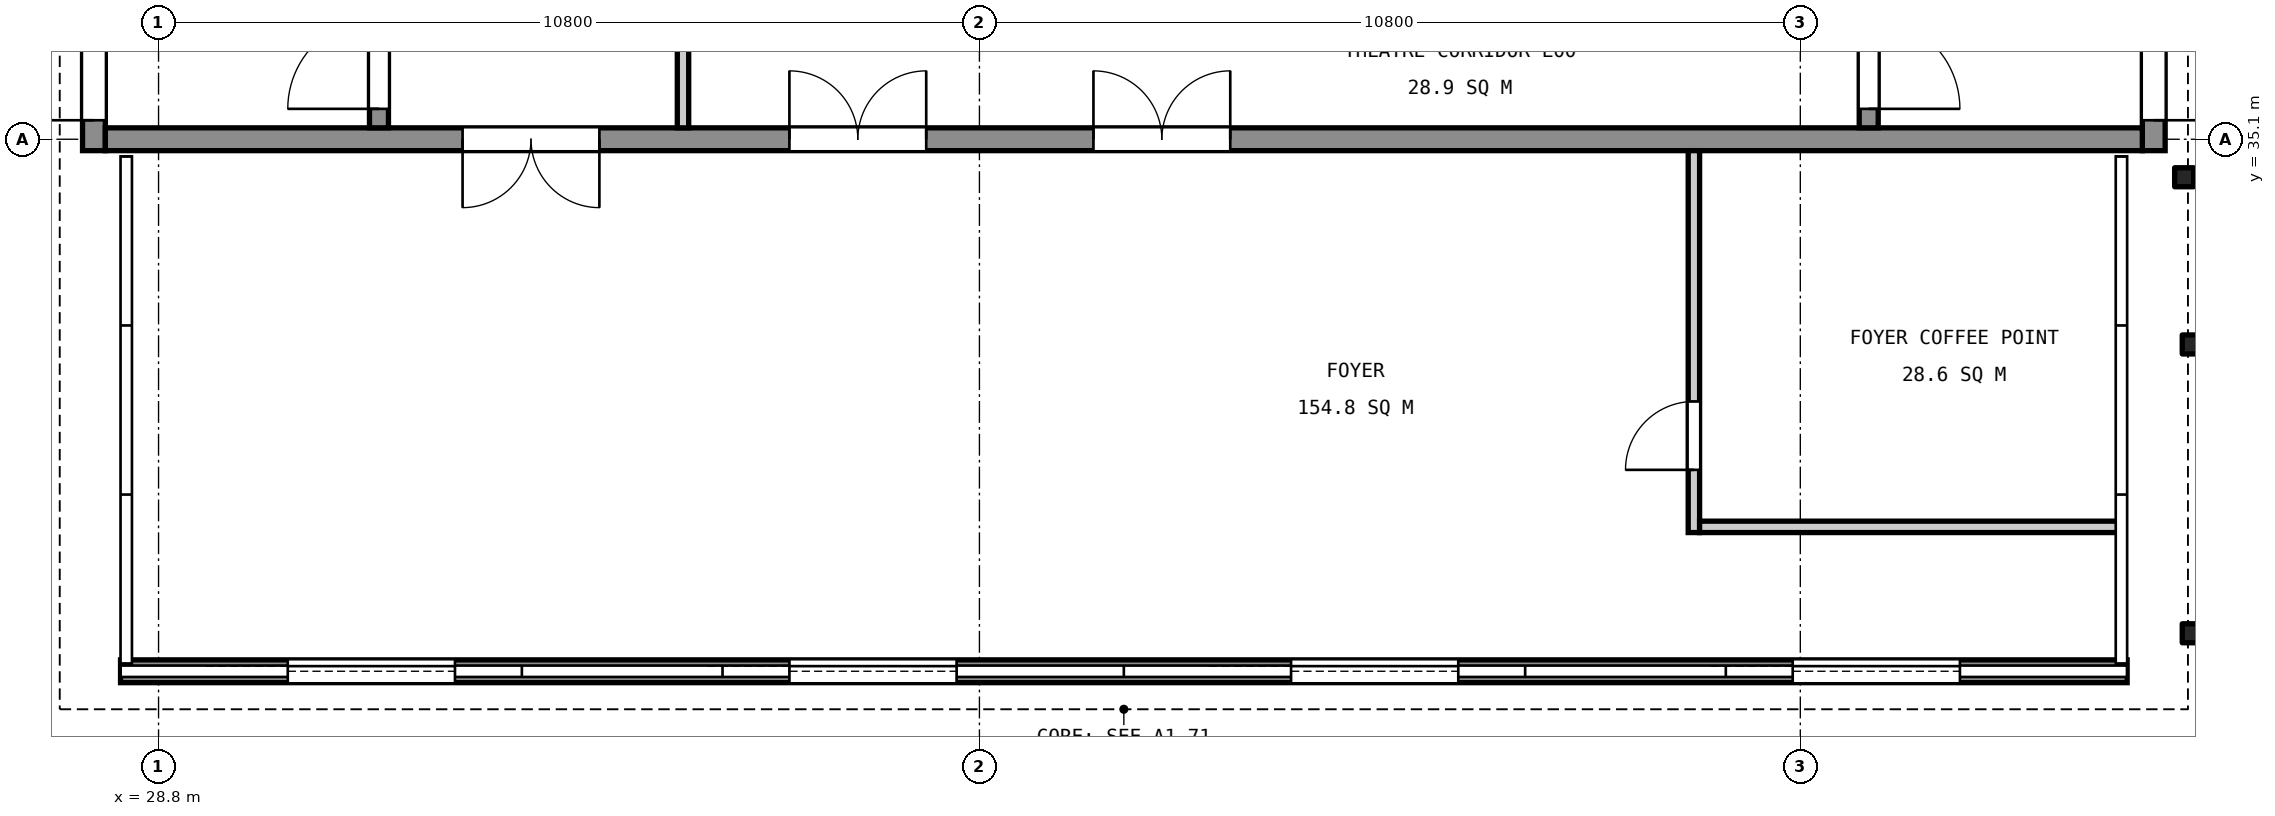
"""IFC4 building model, lengths in metres.
Left out: names, types, materials, properties, quantities, classifications, styles, units other than length and angle.
Written with IfcOpenShell. Run it as: python <this file> out.ifc"""

import sys

from ifc_helpers import new_model, si_unit, direction, frame, frame_2d, origin, origin_2d, place, context, subcontext, project, spatial, rectangle, i_section, extrude, element, fill, save


model = new_model("IFC4")
c1 = context("Model", 3, precision=1e-05, world=origin(), true_north=direction((0.0, 1.0)))
c2 = subcontext(c1, "Body", "Model", "MODEL_VIEW")
j1 = project(units=[si_unit("LENGTHUNIT", "METRE"), si_unit("PLANEANGLEUNIT", "RADIAN")], contexts=[c1])
p1 = place(None, origin())
s1 = spatial("IfcSite", under=j1, at=p1, CompositionType="ELEMENT")
p2 = place(p1, origin())
s2 = spatial("IfcBuilding", under=s1, at=p2, CompositionType="ELEMENT")
p3 = place(p2, origin())
s3 = spatial("IfcBuildingStorey", under=s2, at=p3, CompositionType="ELEMENT", Elevation=0.0)
p4 = place(p3, frame((27.95, 34.95, 0.0), z_axis=(0.0, 0.0, 1.0), x_axis=(0.0, 1.0, 0.0)))
e1 = element("IfcWall", 1, at=p4, inside=s3, PredefinedType="SOLIDWALL", context=c2, shape_type="SweptSolid", body=[
    extrude(rectangle(XDim=8.05, YDim=0.3, at=frame_2d((4.025, 0.0))), origin(), (0.0, 0.0, 1.0), 5.7),
])
p5 = place(p4, frame((0.4, 0.0, 0.0)))
e2 = element("IfcOpeningElement", 2, at=p5, cuts=e1, PredefinedType="OPENING", context=c2, shape_type="SweptSolid", body=[
    extrude(rectangle(XDim=1.5, YDim=2.4, at=frame_2d((0.75, 1.2))), frame((0.0, 0.16, 0.0), z_axis=(0.0, -1.0, 0.0), x_axis=(1.0, 0.0, 0.0)), (0.0, 0.0, 1.0), 0.32),
])
p6 = place(p4, frame((3.25, 0.0, 0.9)))
e3 = element("IfcOpeningElement", 3, at=p6, cuts=e1, PredefinedType="OPENING", context=c2, shape_type="SweptSolid", body=[
    extrude(rectangle(XDim=2.4, YDim=1.8, at=frame_2d((1.2, 0.9))), frame((0.0, 0.16, 0.0), z_axis=(0.0, -1.0, 0.0), x_axis=(1.0, 0.0, 0.0)), (0.0, 0.0, 1.0), 0.32),
])
p7 = place(p4, frame((5.95, 0.0, 0.8)))
e4 = element("IfcOpeningElement", 4, at=p7, cuts=e1, PredefinedType="OPENING", context=c2, shape_type="SweptSolid", body=[
    extrude(rectangle(XDim=0.75, YDim=1.2, at=frame_2d((0.375, 0.6))), frame((0.0, 0.16, 0.0), z_axis=(0.0, -1.0, 0.0), x_axis=(1.0, 0.0, 0.0)), (0.0, 0.0, 1.0), 0.32),
])
p8 = place(p3, frame((55.05, 34.95, 0.0), z_axis=(0.0, 0.0, 1.0), x_axis=(0.0, 1.0, 0.0)))
e5 = element("IfcWall", 5, at=p8, inside=s3, PredefinedType="SOLIDWALL", context=c2, shape_type="SweptSolid", body=[
    extrude(rectangle(XDim=8.05, YDim=0.3, at=frame_2d((4.025, 0.0))), origin(), (0.0, 0.0, 1.0), 5.7),
])
p9 = place(p8, frame((0.4, 0.0, 0.0)))
e6 = element("IfcOpeningElement", 6, at=p9, cuts=e5, PredefinedType="OPENING", context=c2, shape_type="SweptSolid", body=[
    extrude(rectangle(XDim=1.5, YDim=2.4, at=frame_2d((0.75, 1.2))), frame((0.0, 0.16, 0.0), z_axis=(0.0, -1.0, 0.0), x_axis=(1.0, 0.0, 0.0)), (0.0, 0.0, 1.0), 0.32),
])
p10 = place(p8, frame((3.25, 0.0, 0.9)))
e7 = element("IfcOpeningElement", 7, at=p10, cuts=e5, PredefinedType="OPENING", context=c2, shape_type="SweptSolid", body=[
    extrude(rectangle(XDim=2.4, YDim=1.8, at=frame_2d((1.2, 0.9))), frame((0.0, 0.16, 0.0), z_axis=(0.0, -1.0, 0.0), x_axis=(1.0, 0.0, 0.0)), (0.0, 0.0, 1.0), 0.32),
])
p11 = place(p8, frame((5.95, 0.0, 0.8)))
e8 = element("IfcOpeningElement", 8, at=p11, cuts=e5, PredefinedType="OPENING", context=c2, shape_type="SweptSolid", body=[
    extrude(rectangle(XDim=0.75, YDim=1.2, at=frame_2d((0.375, 0.6))), frame((0.0, 0.16, 0.0), z_axis=(0.0, -1.0, 0.0), x_axis=(1.0, 0.0, 0.0)), (0.0, 0.0, 1.0), 0.32),
])
p12 = place(p3, frame((28.1, 35.1, 0.0), z_axis=(0.0, 0.0, 1.0), x_axis=(1.0, 0.0, 0.0)))
e9 = element("IfcWall", 9, at=p12, inside=s3, PredefinedType="SOLIDWALL", context=c2, shape_type="SweptSolid", body=[
    extrude(rectangle(XDim=26.8, YDim=0.3, at=frame_2d((13.4, 0.0))), origin(), (0.0, 0.0, 1.0), 5.7),
])
p13 = place(p12, frame((4.7, 0.0, 0.0)))
e10 = element("IfcOpeningElement", 10, at=p13, cuts=e9, PredefinedType="OPENING", context=c2, shape_type="SweptSolid", body=[
    extrude(rectangle(XDim=1.8, YDim=2.4, at=frame_2d((0.9, 1.2))), frame((0.0, 0.16, 0.0), z_axis=(0.0, -1.0, 0.0), x_axis=(1.0, 0.0, 0.0)), (0.0, 0.0, 1.0), 0.32),
])
p14 = place(p12, frame((9.0, 0.0, 0.0)))
e11 = element("IfcOpeningElement", 11, at=p14, cuts=e9, PredefinedType="OPENING", context=c2, shape_type="SweptSolid", body=[
    extrude(rectangle(XDim=1.8, YDim=2.4, at=frame_2d((0.9, 1.2))), frame((0.0, 0.16, 0.0), z_axis=(0.0, -1.0, 0.0), x_axis=(1.0, 0.0, 0.0)), (0.0, 0.0, 1.0), 0.32),
])
p15 = place(p12, frame((13.0, 0.0, 0.0)))
e12 = element("IfcOpeningElement", 12, at=p15, cuts=e9, PredefinedType="OPENING", context=c2, shape_type="SweptSolid", body=[
    extrude(rectangle(XDim=1.8, YDim=2.4, at=frame_2d((0.9, 1.2))), frame((0.0, 0.16, 0.0), z_axis=(0.0, -1.0, 0.0), x_axis=(1.0, 0.0, 0.0)), (0.0, 0.0, 1.0), 0.32),
])
p16 = place(p3, frame((31.7, 35.25, 0.0), z_axis=(0.0, 0.0, 1.0), x_axis=(0.0, 1.0, 0.0)))
e13 = element("IfcWall", 13, at=p16, inside=s3, PredefinedType="SOLIDWALL", context=c2, shape_type="SweptSolid", body=[
    extrude(rectangle(XDim=7.75, YDim=0.25, at=frame_2d((3.875, 0.0))), origin(), (0.0, 0.0, 1.0), 5.7),
])
p17 = place(p16, frame((0.25, 0.0, 0.0)))
e14 = element("IfcOpeningElement", 14, at=p17, cuts=e13, PredefinedType="OPENING", context=c2, shape_type="SweptSolid", body=[
    extrude(rectangle(XDim=1.2, YDim=2.1, at=frame_2d((0.6, 1.05))), frame((0.0, 0.135, 0.0), z_axis=(0.0, -1.0, 0.0), x_axis=(1.0, 0.0, 0.0)), (0.0, 0.0, 1.0), 0.27),
])
p18 = place(p3, frame((51.3, 35.25, 0.0), z_axis=(0.0, 0.0, 1.0), x_axis=(0.0, 1.0, 0.0)))
e15 = element("IfcWall", 15, at=p18, inside=s3, PredefinedType="SOLIDWALL", context=c2, shape_type="SweptSolid", body=[
    extrude(rectangle(XDim=7.75, YDim=0.25, at=frame_2d((3.875, 0.0))), origin(), (0.0, 0.0, 1.0), 5.7),
])
p19 = place(p18, frame((0.25, 0.0, 0.0)))
e16 = element("IfcOpeningElement", 16, at=p19, cuts=e15, PredefinedType="OPENING", context=c2, shape_type="SweptSolid", body=[
    extrude(rectangle(XDim=1.2, YDim=2.1, at=frame_2d((0.6, 1.05))), frame((0.0, 0.135, 0.0), z_axis=(0.0, -1.0, 0.0), x_axis=(1.0, 0.0, 0.0)), (0.0, 0.0, 1.0), 0.27),
])
p20 = place(p3, frame((35.7, 35.25, 0.0), z_axis=(0.0, 0.0, 1.0), x_axis=(0.0, 1.0, 0.0)))
e17 = element("IfcWall", 17, at=p20, inside=s3, PredefinedType="SOLIDWALL", context=c2, shape_type="SweptSolid", body=[
    extrude(rectangle(XDim=7.75, YDim=0.15, at=frame_2d((3.875, 0.0))), origin(), (0.0, 0.0, 1.0), 5.7),
])
p21 = place(p3, frame((28.3, 28.1, 0.0), z_axis=(0.0, 0.0, 1.0), x_axis=(1.0, 0.0, 0.0)))
e18 = element("IfcWall", 18, at=p21, inside=s3, PredefinedType="SOLIDWALL", context=c2, shape_type="SweptSolid", body=[
    extrude(rectangle(XDim=26.4, YDim=0.3, at=frame_2d((13.2, 0.0))), origin(), (0.0, 0.0, 1.0), 2.6),
])
p22 = place(p21, frame((2.2, 0.0, 0.0)))
e19 = element("IfcOpeningElement", 19, at=p22, cuts=e18, PredefinedType="OPENING", context=c2, shape_type="SweptSolid", body=[
    extrude(rectangle(XDim=2.2, YDim=2.4, at=frame_2d((1.1, 1.2))), frame((0.0, 0.16, 0.0), z_axis=(0.0, -1.0, 0.0), x_axis=(1.0, 0.0, 0.0)), (0.0, 0.0, 1.0), 0.32),
])
p23 = place(p21, frame((8.8, 0.0, 0.0)))
e20 = element("IfcOpeningElement", 20, at=p23, cuts=e18, PredefinedType="OPENING", context=c2, shape_type="SweptSolid", body=[
    extrude(rectangle(XDim=2.2, YDim=2.4, at=frame_2d((1.1, 1.2))), frame((0.0, 0.16, 0.0), z_axis=(0.0, -1.0, 0.0), x_axis=(1.0, 0.0, 0.0)), (0.0, 0.0, 1.0), 0.32),
])
p24 = place(p21, frame((15.4, 0.0, 0.0)))
e21 = element("IfcOpeningElement", 21, at=p24, cuts=e18, PredefinedType="OPENING", context=c2, shape_type="SweptSolid", body=[
    extrude(rectangle(XDim=2.2, YDim=2.4, at=frame_2d((1.1, 1.2))), frame((0.0, 0.16, 0.0), z_axis=(0.0, -1.0, 0.0), x_axis=(1.0, 0.0, 0.0)), (0.0, 0.0, 1.0), 0.32),
])
p25 = place(p21, frame((22.0, 0.0, 0.0)))
e22 = element("IfcOpeningElement", 22, at=p25, cuts=e18, PredefinedType="OPENING", context=c2, shape_type="SweptSolid", body=[
    extrude(rectangle(XDim=2.2, YDim=2.4, at=frame_2d((1.1, 1.2))), frame((0.0, 0.16, 0.0), z_axis=(0.0, -1.0, 0.0), x_axis=(1.0, 0.0, 0.0)), (0.0, 0.0, 1.0), 0.32),
])
p26 = place(p3, frame((49.0, 29.925, 0.0), z_axis=(0.0, 0.0, 1.0), x_axis=(0.0, 1.0, 0.0)))
e23 = element("IfcWall", 23, at=p26, inside=s3, PredefinedType="SOLIDWALL", context=c2, shape_type="SweptSolid", body=[
    extrude(rectangle(XDim=5.025, YDim=0.15, at=frame_2d((2.512, 0.0))), origin(), (0.0, 0.0, 1.0), 4.4),
])
p27 = place(p26, frame((0.825, 0.0, 0.0)))
e24 = element("IfcOpeningElement", 24, at=p27, cuts=e23, PredefinedType="OPENING", context=c2, shape_type="SweptSolid", body=[
    extrude(rectangle(XDim=0.9, YDim=2.1, at=frame_2d((0.45, 1.05))), frame((0.0, 0.085, 0.0), z_axis=(0.0, -1.0, 0.0), x_axis=(1.0, 0.0, 0.0)), (0.0, 0.0, 1.0), 0.17),
])
p28 = place(p3, frame((49.075, 30.0, 0.0), z_axis=(0.0, 0.0, 1.0), x_axis=(1.0, 0.0, 0.0)))
e25 = element("IfcWall", 25, at=p28, inside=s3, PredefinedType="SOLIDWALL", context=c2, shape_type="SweptSolid", body=[
    extrude(rectangle(XDim=5.525, YDim=0.15, at=frame_2d((2.763, 0.0))), origin(), (0.0, 0.0, 1.0), 4.4),
])
for number, where, z_axis, x_axis in (
    (26, (55.45, 34.6, 0.0), (0.0, 0.0, 1.0), (1.0, 0.0, 0.0)),
    (27, (55.55, 28.6, 0.0), (0.0, 0.0, 1.0), (1.0, 0.0, 0.0)),
    (28, (55.55, 32.4, 0.0), (0.0, 0.0, 1.0), (1.0, 0.0, 0.0)),
):
    element("IfcColumn", number, at=place(p3, frame(where, z_axis=z_axis, x_axis=x_axis)), inside=s3, PredefinedType="COLUMN", context=c2, shape_type="SweptSolid", body=[
        extrude(i_section(OverallWidth=0.25, OverallDepth=0.25, WebThickness=0.009, FlangeThickness=0.014, FilletRadius=0.016, at=origin_2d()), origin(), (0.0, 0.0, 1.0), 4.8),
    ])
p29 = place(p5, origin())
e29 = element("IfcDoor", 29, at=p29, inside=s3, OperationType="SINGLE_SWING_LEFT", PredefinedType="DOOR", context=c2, shape_type="SweptSolid", body=[
    extrude(rectangle(XDim=1.5, YDim=2.4, at=frame_2d((0.75, 1.2))), frame((0.0, 0.025, 0.0), z_axis=(0.0, -1.0, 0.0), x_axis=(1.0, 0.0, 0.0)), (0.0, 0.0, 1.0), 0.05),
])
fill(e2, e29)
p30 = place(p9, frame((1.5, 0.0, 0.0), z_axis=(0.0, 0.0, 1.0), x_axis=(-1.0, 0.0, 0.0)))
e30 = element("IfcDoor", 30, at=p30, inside=s3, OperationType="SINGLE_SWING_RIGHT", PredefinedType="DOOR", context=c2, shape_type="SweptSolid", body=[
    extrude(rectangle(XDim=1.5, YDim=2.4, at=frame_2d((0.75, 1.2))), frame((0.0, 0.025, 0.0), z_axis=(0.0, -1.0, 0.0), x_axis=(1.0, 0.0, 0.0)), (0.0, 0.0, 1.0), 0.05),
])
fill(e6, e30)
p31 = place(p17, origin())
e31 = element("IfcDoor", 31, at=p31, inside=s3, OperationType="SINGLE_SWING_LEFT", PredefinedType="DOOR", context=c2, shape_type="SweptSolid", body=[
    extrude(rectangle(XDim=1.2, YDim=2.1, at=frame_2d((0.6, 1.05))), frame((0.0, 0.025, 0.0), z_axis=(0.0, -1.0, 0.0), x_axis=(1.0, 0.0, 0.0)), (0.0, 0.0, 1.0), 0.05),
])
fill(e14, e31)
p32 = place(p19, frame((1.2, 0.0, 0.0), z_axis=(0.0, 0.0, 1.0), x_axis=(-1.0, 0.0, 0.0)))
e32 = element("IfcDoor", 32, at=p32, inside=s3, OperationType="SINGLE_SWING_RIGHT", PredefinedType="DOOR", context=c2, shape_type="SweptSolid", body=[
    extrude(rectangle(XDim=1.2, YDim=2.1, at=frame_2d((0.6, 1.05))), frame((0.0, 0.025, 0.0), z_axis=(0.0, -1.0, 0.0), x_axis=(1.0, 0.0, 0.0)), (0.0, 0.0, 1.0), 0.05),
])
fill(e16, e32)
p33 = place(p13, frame((1.8, 0.0, 0.0), z_axis=(0.0, 0.0, 1.0), x_axis=(-1.0, 0.0, 0.0)))
e33 = element("IfcDoor", 33, at=p33, inside=s3, OperationType="DOUBLE_DOOR_SINGLE_SWING", PredefinedType="DOOR", context=c2, shape_type="SweptSolid", body=[
    extrude(rectangle(XDim=1.8, YDim=2.4, at=frame_2d((0.9, 1.2))), frame((0.0, 0.025, 0.0), z_axis=(0.0, -1.0, 0.0), x_axis=(1.0, 0.0, 0.0)), (0.0, 0.0, 1.0), 0.05),
])
fill(e10, e33)
p34 = place(p14, origin())
e34 = element("IfcDoor", 34, at=p34, inside=s3, OperationType="DOUBLE_DOOR_SINGLE_SWING", PredefinedType="DOOR", context=c2, shape_type="SweptSolid", body=[
    extrude(rectangle(XDim=1.8, YDim=2.4, at=frame_2d((0.9, 1.2))), frame((0.0, 0.025, 0.0), z_axis=(0.0, -1.0, 0.0), x_axis=(1.0, 0.0, 0.0)), (0.0, 0.0, 1.0), 0.05),
])
fill(e11, e34)
p35 = place(p15, origin())
e35 = element("IfcDoor", 35, at=p35, inside=s3, OperationType="DOUBLE_DOOR_SINGLE_SWING", PredefinedType="DOOR", context=c2, shape_type="SweptSolid", body=[
    extrude(rectangle(XDim=1.8, YDim=2.4, at=frame_2d((0.9, 1.2))), frame((0.0, 0.025, 0.0), z_axis=(0.0, -1.0, 0.0), x_axis=(1.0, 0.0, 0.0)), (0.0, 0.0, 1.0), 0.05),
])
fill(e12, e35)
p36 = place(p22, frame((2.2, 0.0, 0.0), z_axis=(0.0, 0.0, 1.0), x_axis=(-1.0, 0.0, 0.0)))
e36 = element("IfcDoor", 36, at=p36, inside=s3, OperationType="SLIDING_TO_RIGHT", PredefinedType="DOOR", context=c2, shape_type="SweptSolid", body=[
    extrude(rectangle(XDim=2.2, YDim=2.4, at=frame_2d((1.1, 1.2))), frame((0.0, 0.025, 0.0), z_axis=(0.0, -1.0, 0.0), x_axis=(1.0, 0.0, 0.0)), (0.0, 0.0, 1.0), 0.05),
])
fill(e19, e36)
p37 = place(p23, frame((2.2, 0.0, 0.0), z_axis=(0.0, 0.0, 1.0), x_axis=(-1.0, 0.0, 0.0)))
e37 = element("IfcDoor", 37, at=p37, inside=s3, OperationType="SLIDING_TO_RIGHT", PredefinedType="DOOR", context=c2, shape_type="SweptSolid", body=[
    extrude(rectangle(XDim=2.2, YDim=2.4, at=frame_2d((1.1, 1.2))), frame((0.0, 0.025, 0.0), z_axis=(0.0, -1.0, 0.0), x_axis=(1.0, 0.0, 0.0)), (0.0, 0.0, 1.0), 0.05),
])
fill(e20, e37)
p38 = place(p24, frame((2.2, 0.0, 0.0), z_axis=(0.0, 0.0, 1.0), x_axis=(-1.0, 0.0, 0.0)))
e38 = element("IfcDoor", 38, at=p38, inside=s3, OperationType="SLIDING_TO_RIGHT", PredefinedType="DOOR", context=c2, shape_type="SweptSolid", body=[
    extrude(rectangle(XDim=2.2, YDim=2.4, at=frame_2d((1.1, 1.2))), frame((0.0, 0.025, 0.0), z_axis=(0.0, -1.0, 0.0), x_axis=(1.0, 0.0, 0.0)), (0.0, 0.0, 1.0), 0.05),
])
fill(e21, e38)
p39 = place(p25, frame((2.2, 0.0, 0.0), z_axis=(0.0, 0.0, 1.0), x_axis=(-1.0, 0.0, 0.0)))
e39 = element("IfcDoor", 39, at=p39, inside=s3, OperationType="SLIDING_TO_RIGHT", PredefinedType="DOOR", context=c2, shape_type="SweptSolid", body=[
    extrude(rectangle(XDim=2.2, YDim=2.4, at=frame_2d((1.1, 1.2))), frame((0.0, 0.025, 0.0), z_axis=(0.0, -1.0, 0.0), x_axis=(1.0, 0.0, 0.0)), (0.0, 0.0, 1.0), 0.05),
])
fill(e22, e39)
p40 = place(p27, origin())
e40 = element("IfcDoor", 40, at=p40, inside=s3, OperationType="SINGLE_SWING_LEFT", PredefinedType="DOOR", context=c2, shape_type="SweptSolid", body=[
    extrude(rectangle(XDim=0.9, YDim=2.1, at=frame_2d((0.45, 1.05))), frame((0.0, 0.025, 0.0), z_axis=(0.0, -1.0, 0.0), x_axis=(1.0, 0.0, 0.0)), (0.0, 0.0, 1.0), 0.05),
])
fill(e24, e40)
save(model, sys.argv[1])
